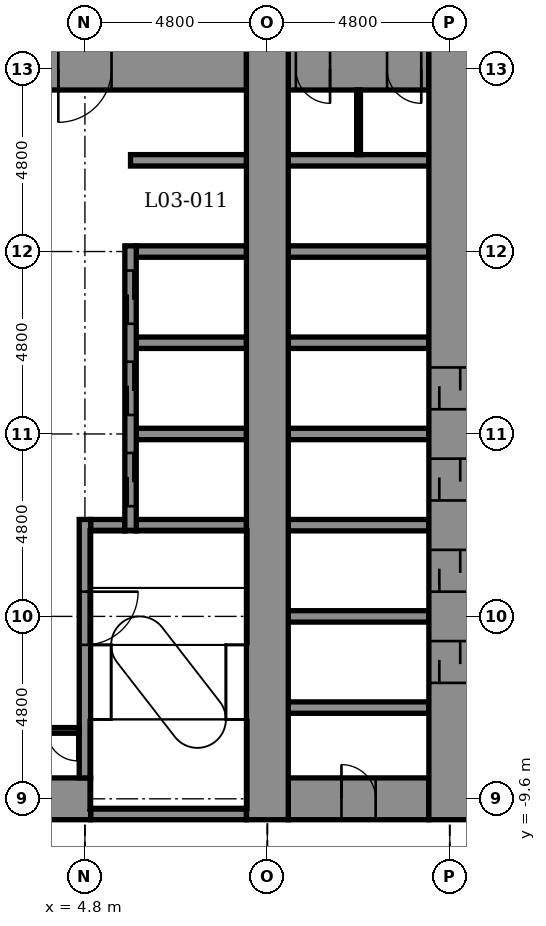
"""IFC4 building model, lengths in metres.
Left out: names, types, materials, properties, quantities, classifications, styles, units other than length and angle.
Written with IfcOpenShell. Run it as: python <this file> out.ifc"""

import sys

from ifc_helpers import new_model, si_unit, direction, frame, frame_2d, origin, place, context, subcontext, project, spatial, rectangle, extrude, element, fill, save


model = new_model("IFC4")
c1 = context("Model", 3, precision=1e-05, world=origin(), true_north=direction((0.0, 1.0)))
c2 = subcontext(c1, "Body", "Model", "MODEL_VIEW")
j1 = project(units=[si_unit("LENGTHUNIT", "METRE"), si_unit("PLANEANGLEUNIT", "RADIAN")], contexts=[c1])
p1 = place(None, origin())
s1 = spatial("IfcSite", under=j1, at=p1, CompositionType="ELEMENT")
p2 = place(p1, origin())
s2 = spatial("IfcBuilding", under=s1, at=p2, CompositionType="ELEMENT")
p3 = place(p2, frame((0.0, 0.0, 17.4)))
s3 = spatial("IfcBuildingStorey", under=s2, at=p3, CompositionType="ELEMENT", Elevation=17.4)
p4 = place(p3, frame((4.95, -10.0, -0.25), z_axis=(0.0, 0.0, 1.0), x_axis=(1.0, 0.0, 0.0)))
e1 = element("IfcWall", 1, at=p4, inside=s3, PredefinedType="STANDARD", context=c2, shape_type="SweptSolid", body=[
    extrude(rectangle(XDim=4.1, YDim=0.3, at=frame_2d((2.05, 0.0))), origin(), (0.0, 0.0, 1.0), 5.0),
])
p5 = place(p3, frame((-5.25, -9.6, -0.25), z_axis=(0.0, 0.0, 1.0), x_axis=(1.0, 0.0, 0.0)))
e2 = element("IfcWall", 2, at=p5, inside=s3, PredefinedType="SHEAR", context=c2, shape_type="SweptSolid", body=[
    extrude(rectangle(XDim=10.2, YDim=1.1, at=frame_2d((5.1, 0.0))), origin(), (0.0, 0.0, 1.0), 5.0),
])
p6 = place(p5, frame((0.6, 0.0, 0.25)))
e3 = element("IfcOpeningElement", 3, at=p6, cuts=e2, PredefinedType="OPENING", context=c2, shape_type="SweptSolid", body=[
    extrude(rectangle(XDim=0.9, YDim=2.1, at=frame_2d((0.45, 1.05))), frame((0.0, 0.56, 0.0), z_axis=(0.0, -1.0, 0.0), x_axis=(1.0, 0.0, 0.0)), (0.0, 0.0, 1.0), 1.12),
])
p7 = place(p3, frame((10.15, -9.6, -0.25), z_axis=(0.0, 0.0, 1.0), x_axis=(1.0, 0.0, 0.0)))
e4 = element("IfcWall", 4, at=p7, inside=s3, PredefinedType="SHEAR", context=c2, shape_type="SweptSolid", body=[
    extrude(rectangle(XDim=3.7, YDim=1.1, at=frame_2d((1.85, 0.0))), origin(), (0.0, 0.0, 1.0), 5.0),
])
p8 = place(p7, frame((1.4, 0.0, 0.25)))
e5 = element("IfcOpeningElement", 5, at=p8, cuts=e4, PredefinedType="OPENING", context=c2, shape_type="SweptSolid", body=[
    extrude(rectangle(XDim=0.9, YDim=2.1, at=frame_2d((0.45, 1.05))), frame((0.0, 0.56, 0.0), z_axis=(0.0, -1.0, 0.0), x_axis=(1.0, 0.0, 0.0)), (0.0, 0.0, 1.0), 1.12),
])
for number, where, z_axis, x_axis in (
    (6, (10.15, -7.2, -0.25), (0.0, 0.0, 1.0), (1.0, 0.0, 0.0)),
    (7, (10.15, -4.8, -0.25), (0.0, 0.0, 1.0), (1.0, 0.0, 0.0)),
):
    element("IfcWall", number, at=place(p3, frame(where, z_axis=z_axis, x_axis=x_axis)), inside=s3, PredefinedType="STANDARD", context=c2, shape_type="SweptSolid", body=[
        extrude(rectangle(XDim=3.7, YDim=0.3, at=frame_2d((1.85, 0.0))), origin(), (0.0, 0.0, 1.0), 5.0),
    ])
p9 = place(p3, frame((4.95, -2.4, -0.25), z_axis=(0.0, 0.0, 1.0), x_axis=(1.0, 0.0, 0.0)))
e8 = element("IfcWall", 8, at=p9, inside=s3, PredefinedType="STANDARD", context=c2, shape_type="SweptSolid", body=[
    extrude(rectangle(XDim=0.9, YDim=0.3, at=frame_2d((0.45, 0.0))), origin(), (0.0, 0.0, 1.0), 5.0),
])
p10 = place(p3, frame((6.15, -2.4, -0.25), z_axis=(0.0, 0.0, 1.0), x_axis=(1.0, 0.0, 0.0)))
e9 = element("IfcWall", 9, at=p10, inside=s3, PredefinedType="STANDARD", context=c2, shape_type="SweptSolid", body=[
    extrude(rectangle(XDim=2.9, YDim=0.3, at=frame_2d((1.45, 0.0))), origin(), (0.0, 0.0, 1.0), 5.0),
])
p11 = place(p3, frame((10.15, -2.4, -0.25), z_axis=(0.0, 0.0, 1.0), x_axis=(1.0, 0.0, 0.0)))
e10 = element("IfcWall", 10, at=p11, inside=s3, PredefinedType="STANDARD", context=c2, shape_type="SweptSolid", body=[
    extrude(rectangle(XDim=3.7, YDim=0.3, at=frame_2d((1.85, 0.0))), origin(), (0.0, 0.0, 1.0), 5.0),
])
p12 = place(p3, frame((6.15, 0.0, -0.25), z_axis=(0.0, 0.0, 1.0), x_axis=(1.0, 0.0, 0.0)))
e11 = element("IfcWall", 11, at=p12, inside=s3, PredefinedType="STANDARD", context=c2, shape_type="SweptSolid", body=[
    extrude(rectangle(XDim=2.9, YDim=0.3, at=frame_2d((1.45, 0.0))), origin(), (0.0, 0.0, 1.0), 5.0),
])
p13 = place(p3, frame((10.15, 0.0, -0.25), z_axis=(0.0, 0.0, 1.0), x_axis=(1.0, 0.0, 0.0)))
e12 = element("IfcWall", 12, at=p13, inside=s3, PredefinedType="STANDARD", context=c2, shape_type="SweptSolid", body=[
    extrude(rectangle(XDim=3.7, YDim=0.3, at=frame_2d((1.85, 0.0))), origin(), (0.0, 0.0, 1.0), 5.0),
])
p14 = place(p3, frame((6.15, 2.4, -0.25), z_axis=(0.0, 0.0, 1.0), x_axis=(1.0, 0.0, 0.0)))
e13 = element("IfcWall", 13, at=p14, inside=s3, PredefinedType="STANDARD", context=c2, shape_type="SweptSolid", body=[
    extrude(rectangle(XDim=2.9, YDim=0.3, at=frame_2d((1.45, 0.0))), origin(), (0.0, 0.0, 1.0), 5.0),
])
p15 = place(p3, frame((10.15, 2.4, -0.25), z_axis=(0.0, 0.0, 1.0), x_axis=(1.0, 0.0, 0.0)))
e14 = element("IfcWall", 14, at=p15, inside=s3, PredefinedType="STANDARD", context=c2, shape_type="SweptSolid", body=[
    extrude(rectangle(XDim=3.7, YDim=0.3, at=frame_2d((1.85, 0.0))), origin(), (0.0, 0.0, 1.0), 5.0),
])
p16 = place(p3, frame((6.15, 4.8, -0.25), z_axis=(0.0, 0.0, 1.0), x_axis=(1.0, 0.0, 0.0)))
e15 = element("IfcWall", 15, at=p16, inside=s3, PredefinedType="STANDARD", context=c2, shape_type="SweptSolid", body=[
    extrude(rectangle(XDim=2.9, YDim=0.3, at=frame_2d((1.45, 0.0))), origin(), (0.0, 0.0, 1.0), 5.0),
])
p17 = place(p3, frame((10.15, 4.8, -0.25), z_axis=(0.0, 0.0, 1.0), x_axis=(1.0, 0.0, 0.0)))
e16 = element("IfcWall", 16, at=p17, inside=s3, PredefinedType="STANDARD", context=c2, shape_type="SweptSolid", body=[
    extrude(rectangle(XDim=3.7, YDim=0.3, at=frame_2d((1.85, 0.0))), origin(), (0.0, 0.0, 1.0), 5.0),
])
p18 = place(p3, frame((6.0, 7.2, -0.25), z_axis=(0.0, 0.0, 1.0), x_axis=(1.0, 0.0, 0.0)))
e17 = element("IfcWall", 17, at=p18, inside=s3, PredefinedType="STANDARD", context=c2, shape_type="SweptSolid", body=[
    extrude(rectangle(XDim=3.05, YDim=0.3, at=frame_2d((1.525, 0.0))), origin(), (0.0, 0.0, 1.0), 5.0),
])
p19 = place(p3, frame((10.15, 7.2, -0.25), z_axis=(0.0, 0.0, 1.0), x_axis=(1.0, 0.0, 0.0)))
e18 = element("IfcWall", 18, at=p19, inside=s3, PredefinedType="STANDARD", context=c2, shape_type="SweptSolid", body=[
    extrude(rectangle(XDim=3.7, YDim=0.3, at=frame_2d((1.85, 0.0))), origin(), (0.0, 0.0, 1.0), 5.0),
])
p20 = place(p3, frame((-5.25, 9.6, -0.25), z_axis=(0.0, 0.0, 1.0), x_axis=(1.0, 0.0, 0.0)))
e19 = element("IfcWall", 19, at=p20, inside=s3, PredefinedType="SHEAR", context=c2, shape_type="SweptSolid", body=[
    extrude(rectangle(XDim=14.3, YDim=1.1, at=frame_2d((7.15, 0.0))), origin(), (0.0, 0.0, 1.0), 5.0),
])
p21 = place(p20, frame((9.35, 0.0, 0.25)))
e20 = element("IfcOpeningElement", 20, at=p21, cuts=e19, PredefinedType="OPENING", context=c2, shape_type="SweptSolid", body=[
    extrude(rectangle(XDim=1.4, YDim=2.1, at=frame_2d((0.7, 1.05))), frame((0.0, 0.56, 0.0), z_axis=(0.0, -1.0, 0.0), x_axis=(1.0, 0.0, 0.0)), (0.0, 0.0, 1.0), 1.12),
])
p22 = place(p3, frame((10.15, 9.6, -0.25), z_axis=(0.0, 0.0, 1.0), x_axis=(1.0, 0.0, 0.0)))
e21 = element("IfcWall", 21, at=p22, inside=s3, PredefinedType="SHEAR", context=c2, shape_type="SweptSolid", body=[
    extrude(rectangle(XDim=3.7, YDim=1.1, at=frame_2d((1.85, 0.0))), origin(), (0.0, 0.0, 1.0), 5.0),
])
p23 = place(p22, frame((0.2, 0.0, 0.25)))
e22 = element("IfcOpeningElement", 22, at=p23, cuts=e21, PredefinedType="OPENING", context=c2, shape_type="SweptSolid", body=[
    extrude(rectangle(XDim=0.9, YDim=2.1, at=frame_2d((0.45, 1.05))), frame((0.0, 0.56, 0.0), z_axis=(0.0, -1.0, 0.0), x_axis=(1.0, 0.0, 0.0)), (0.0, 0.0, 1.0), 1.12),
])
p24 = place(p22, frame((2.6, 0.0, 0.25)))
e23 = element("IfcOpeningElement", 23, at=p24, cuts=e21, PredefinedType="OPENING", context=c2, shape_type="SweptSolid", body=[
    extrude(rectangle(XDim=0.9, YDim=2.1, at=frame_2d((0.45, 1.05))), frame((0.0, 0.56, 0.0), z_axis=(0.0, -1.0, 0.0), x_axis=(1.0, 0.0, 0.0)), (0.0, 0.0, 1.0), 1.12),
])
p25 = place(p3, frame((4.8, -9.05, -0.25), z_axis=(0.0, 0.0, 1.0), x_axis=(0.0, 1.0, 0.0)))
e24 = element("IfcWall", 24, at=p25, inside=s3, PredefinedType="STANDARD", context=c2, shape_type="SweptSolid", body=[
    extrude(rectangle(XDim=6.8, YDim=0.3, at=frame_2d((3.4, 0.0))), origin(), (0.0, 0.0, 1.0), 5.0),
])
p26 = place(p25, frame((3.5, 0.0, 0.25)))
e25 = element("IfcOpeningElement", 25, at=p26, cuts=e24, PredefinedType="OPENING", context=c2, shape_type="SweptSolid", body=[
    extrude(rectangle(XDim=1.4, YDim=2.1, at=frame_2d((0.7, 1.05))), frame((0.0, 0.16, 0.0), z_axis=(0.0, -1.0, 0.0), x_axis=(1.0, 0.0, 0.0)), (0.0, 0.0, 1.0), 0.32),
])
p27 = place(p3, frame((6.0, -2.55, -0.25), z_axis=(0.0, 0.0, 1.0), x_axis=(0.0, 1.0, 0.0)))
e26 = element("IfcWall", 26, at=p27, inside=s3, PredefinedType="STANDARD", context=c2, shape_type="SweptSolid", body=[
    extrude(rectangle(XDim=7.5, YDim=0.3, at=frame_2d((3.75, 0.0))), origin(), (0.0, 0.0, 1.0), 5.0),
])
p28 = place(p27, frame((0.65, 0.0, 0.25)))
e27 = element("IfcOpeningElement", 27, at=p28, cuts=e26, PredefinedType="OPENING", context=c2, shape_type="SweptSolid", body=[
    extrude(rectangle(XDim=1.4, YDim=2.1, at=frame_2d((0.7, 1.05))), frame((0.0, 0.16, 0.0), z_axis=(0.0, -1.0, 0.0), x_axis=(1.0, 0.0, 0.0)), (0.0, 0.0, 1.0), 0.32),
])
p29 = place(p27, frame((3.05, 0.0, 0.25)))
e28 = element("IfcOpeningElement", 28, at=p29, cuts=e26, PredefinedType="OPENING", context=c2, shape_type="SweptSolid", body=[
    extrude(rectangle(XDim=1.4, YDim=2.1, at=frame_2d((0.7, 1.05))), frame((0.0, 0.16, 0.0), z_axis=(0.0, -1.0, 0.0), x_axis=(1.0, 0.0, 0.0)), (0.0, 0.0, 1.0), 0.32),
])
p30 = place(p27, frame((5.45, 0.0, 0.25)))
e29 = element("IfcOpeningElement", 29, at=p30, cuts=e26, PredefinedType="OPENING", context=c2, shape_type="SweptSolid", body=[
    extrude(rectangle(XDim=1.4, YDim=2.1, at=frame_2d((0.7, 1.05))), frame((0.0, 0.16, 0.0), z_axis=(0.0, -1.0, 0.0), x_axis=(1.0, 0.0, 0.0)), (0.0, 0.0, 1.0), 0.32),
])
p31 = place(p3, frame((9.6, -10.15, -0.25), z_axis=(0.0, 0.0, 1.0), x_axis=(0.0, 1.0, 0.0)))
e30 = element("IfcWall", 30, at=p31, inside=s3, PredefinedType="SHEAR", context=c2, shape_type="SweptSolid", body=[
    extrude(rectangle(XDim=20.3, YDim=1.1, at=frame_2d((10.15, 0.0))), origin(), (0.0, 0.0, 1.0), 5.0),
])
p32 = place(p3, frame((14.4, -10.15, -0.25), z_axis=(0.0, 0.0, 1.0), x_axis=(0.0, 1.0, 0.0)))
e31 = element("IfcWall", 31, at=p32, inside=s3, PredefinedType="SHEAR", context=c2, shape_type="SweptSolid", body=[
    extrude(rectangle(XDim=20.3, YDim=1.1, at=frame_2d((10.15, 0.0))), origin(), (0.0, 0.0, 1.0), 5.0),
])
p33 = place(p32, frame((3.6, 0.0, 0.25)))
e32 = element("IfcOpeningElement", 32, at=p33, cuts=e31, PredefinedType="OPENING", context=c2, shape_type="SweptSolid", body=[
    extrude(rectangle(XDim=1.1, YDim=2.1, at=frame_2d((0.55, 1.05))), frame((0.0, 0.56, 0.0), z_axis=(0.0, -1.0, 0.0), x_axis=(1.0, 0.0, 0.0)), (0.0, 0.0, 1.0), 1.12),
])
p34 = place(p32, frame((6.0, 0.0, 0.25)))
e33 = element("IfcOpeningElement", 33, at=p34, cuts=e31, PredefinedType="OPENING", context=c2, shape_type="SweptSolid", body=[
    extrude(rectangle(XDim=1.1, YDim=2.1, at=frame_2d((0.55, 1.05))), frame((0.0, 0.56, 0.0), z_axis=(0.0, -1.0, 0.0), x_axis=(1.0, 0.0, 0.0)), (0.0, 0.0, 1.0), 1.12),
])
p35 = place(p32, frame((8.4, 0.0, 0.25)))
e34 = element("IfcOpeningElement", 34, at=p35, cuts=e31, PredefinedType="OPENING", context=c2, shape_type="SweptSolid", body=[
    extrude(rectangle(XDim=1.1, YDim=2.1, at=frame_2d((0.55, 1.05))), frame((0.0, 0.56, 0.0), z_axis=(0.0, -1.0, 0.0), x_axis=(1.0, 0.0, 0.0)), (0.0, 0.0, 1.0), 1.12),
])
p36 = place(p32, frame((10.8, 0.0, 0.25)))
e35 = element("IfcOpeningElement", 35, at=p36, cuts=e31, PredefinedType="OPENING", context=c2, shape_type="SweptSolid", body=[
    extrude(rectangle(XDim=1.1, YDim=2.1, at=frame_2d((0.55, 1.05))), frame((0.0, 0.56, 0.0), z_axis=(0.0, -1.0, 0.0), x_axis=(1.0, 0.0, 0.0)), (0.0, 0.0, 1.0), 1.12),
])
p37 = place(p3, frame((12.0, 7.35, 0.0), z_axis=(0.0, 0.0, 1.0), x_axis=(0.0, 1.0, 0.0)))
e36 = element("IfcWall", 36, at=p37, inside=s3, PredefinedType="PARTITIONING", context=c2, shape_type="SweptSolid", body=[
    extrude(rectangle(XDim=1.7, YDim=0.1, at=frame_2d((0.85, 0.0))), origin(), (0.0, 0.0, 1.0), 4.75),
])
p38 = place(p3, frame((3.75, -7.8, 0.0), z_axis=(0.0, 0.0, 1.0), x_axis=(1.0, 0.0, 0.0)))
e37 = element("IfcWall", 37, at=p38, inside=s3, PredefinedType="PARTITIONING", context=c2, shape_type="SweptSolid", body=[
    extrude(rectangle(XDim=0.9, YDim=0.15, at=frame_2d((0.45, 0.0))), origin(), (0.0, 0.0, 1.0), 4.75),
])
p39 = place(p38, frame((0.05, 0.0, 0.0)))
e38 = element("IfcOpeningElement", 38, at=p39, cuts=e37, PredefinedType="OPENING", context=c2, shape_type="SweptSolid", body=[
    extrude(rectangle(XDim=0.8, YDim=2.1, at=frame_2d((0.4, 1.05))), frame((0.0, 0.085, 0.0), z_axis=(0.0, -1.0, 0.0), x_axis=(1.0, 0.0, 0.0)), (0.0, 0.0, 1.0), 0.17),
])
p40 = place(p39, frame((0.8, 0.0, 0.0), z_axis=(0.0, 0.0, 1.0), x_axis=(-1.0, 0.0, 0.0)))
e39 = element("IfcDoor", 39, at=p40, inside=s3, OperationType="SINGLE_SWING_RIGHT", PredefinedType="DOOR", context=c2, shape_type="SweptSolid", body=[
    extrude(rectangle(XDim=0.8, YDim=2.1, at=frame_2d((0.4, 1.05))), frame((0.0, 0.025, 0.0), z_axis=(0.0, -1.0, 0.0), x_axis=(1.0, 0.0, 0.0)), (0.0, 0.0, 1.0), 0.05),
])
fill(e38, e39)
p41 = place(p28, origin())
e40 = element("IfcDoor", 40, at=p41, inside=s3, OperationType="DOUBLE_DOOR_SLIDING", PredefinedType="DOOR", context=c2, shape_type="SweptSolid", body=[
    extrude(rectangle(XDim=1.4, YDim=2.1, at=frame_2d((0.7, 1.05))), frame((0.0, 0.025, 0.0), z_axis=(0.0, -1.0, 0.0), x_axis=(1.0, 0.0, 0.0)), (0.0, 0.0, 1.0), 0.05),
])
fill(e27, e40)
p42 = place(p29, origin())
e41 = element("IfcDoor", 41, at=p42, inside=s3, OperationType="DOUBLE_DOOR_SLIDING", PredefinedType="DOOR", context=c2, shape_type="SweptSolid", body=[
    extrude(rectangle(XDim=1.4, YDim=2.1, at=frame_2d((0.7, 1.05))), frame((0.0, 0.025, 0.0), z_axis=(0.0, -1.0, 0.0), x_axis=(1.0, 0.0, 0.0)), (0.0, 0.0, 1.0), 0.05),
])
fill(e28, e41)
p43 = place(p30, origin())
e42 = element("IfcDoor", 42, at=p43, inside=s3, OperationType="DOUBLE_DOOR_SLIDING", PredefinedType="DOOR", context=c2, shape_type="SweptSolid", body=[
    extrude(rectangle(XDim=1.4, YDim=2.1, at=frame_2d((0.7, 1.05))), frame((0.0, 0.025, 0.0), z_axis=(0.0, -1.0, 0.0), x_axis=(1.0, 0.0, 0.0)), (0.0, 0.0, 1.0), 0.05),
])
fill(e29, e42)
p44 = place(p33, origin())
e43 = element("IfcDoor", 43, at=p44, inside=s3, OperationType="DOUBLE_DOOR_SLIDING", PredefinedType="DOOR", context=c2, shape_type="SweptSolid", body=[
    extrude(rectangle(XDim=1.1, YDim=2.1, at=frame_2d((0.55, 1.05))), frame((0.0, 0.025, 0.0), z_axis=(0.0, -1.0, 0.0), x_axis=(1.0, 0.0, 0.0)), (0.0, 0.0, 1.0), 0.05),
])
fill(e32, e43)
p45 = place(p34, origin())
e44 = element("IfcDoor", 44, at=p45, inside=s3, OperationType="DOUBLE_DOOR_SLIDING", PredefinedType="DOOR", context=c2, shape_type="SweptSolid", body=[
    extrude(rectangle(XDim=1.1, YDim=2.1, at=frame_2d((0.55, 1.05))), frame((0.0, 0.025, 0.0), z_axis=(0.0, -1.0, 0.0), x_axis=(1.0, 0.0, 0.0)), (0.0, 0.0, 1.0), 0.05),
])
fill(e33, e44)
p46 = place(p35, origin())
e45 = element("IfcDoor", 45, at=p46, inside=s3, OperationType="DOUBLE_DOOR_SLIDING", PredefinedType="DOOR", context=c2, shape_type="SweptSolid", body=[
    extrude(rectangle(XDim=1.1, YDim=2.1, at=frame_2d((0.55, 1.05))), frame((0.0, 0.025, 0.0), z_axis=(0.0, -1.0, 0.0), x_axis=(1.0, 0.0, 0.0)), (0.0, 0.0, 1.0), 0.05),
])
fill(e34, e45)
p47 = place(p36, origin())
e46 = element("IfcDoor", 46, at=p47, inside=s3, OperationType="DOUBLE_DOOR_SLIDING", PredefinedType="DOOR", context=c2, shape_type="SweptSolid", body=[
    extrude(rectangle(XDim=1.1, YDim=2.1, at=frame_2d((0.55, 1.05))), frame((0.0, 0.025, 0.0), z_axis=(0.0, -1.0, 0.0), x_axis=(1.0, 0.0, 0.0)), (0.0, 0.0, 1.0), 0.05),
])
fill(e35, e46)
p48 = place(p26, frame((1.4, 0.0, 0.0), z_axis=(0.0, 0.0, 1.0), x_axis=(-1.0, 0.0, 0.0)))
e47 = element("IfcDoor", 47, at=p48, inside=s3, OperationType="SINGLE_SWING_RIGHT", PredefinedType="DOOR", context=c2, shape_type="SweptSolid", body=[
    extrude(rectangle(XDim=1.4, YDim=2.1, at=frame_2d((0.7, 1.05))), frame((0.0, 0.025, 0.0), z_axis=(0.0, -1.0, 0.0), x_axis=(1.0, 0.0, 0.0)), (0.0, 0.0, 1.0), 0.05),
])
fill(e25, e47)
p49 = place(p8, origin())
e48 = element("IfcDoor", 48, at=p49, inside=s3, OperationType="SINGLE_SWING_LEFT", PredefinedType="DOOR", context=c2, shape_type="SweptSolid", body=[
    extrude(rectangle(XDim=0.9, YDim=2.1, at=frame_2d((0.45, 1.05))), frame((0.0, 0.025, 0.0), z_axis=(0.0, -1.0, 0.0), x_axis=(1.0, 0.0, 0.0)), (0.0, 0.0, 1.0), 0.05),
])
fill(e5, e48)
p50 = place(p23, frame((0.9, 0.0, 0.0), z_axis=(0.0, 0.0, 1.0), x_axis=(-1.0, 0.0, 0.0)))
e49 = element("IfcDoor", 49, at=p50, inside=s3, OperationType="SINGLE_SWING_RIGHT", PredefinedType="DOOR", context=c2, shape_type="SweptSolid", body=[
    extrude(rectangle(XDim=0.9, YDim=2.1, at=frame_2d((0.45, 1.05))), frame((0.0, 0.025, 0.0), z_axis=(0.0, -1.0, 0.0), x_axis=(1.0, 0.0, 0.0)), (0.0, 0.0, 1.0), 0.05),
])
fill(e22, e49)
p51 = place(p24, frame((0.9, 0.0, 0.0), z_axis=(0.0, 0.0, 1.0), x_axis=(-1.0, 0.0, 0.0)))
e50 = element("IfcDoor", 50, at=p51, inside=s3, OperationType="SINGLE_SWING_RIGHT", PredefinedType="DOOR", context=c2, shape_type="SweptSolid", body=[
    extrude(rectangle(XDim=0.9, YDim=2.1, at=frame_2d((0.45, 1.05))), frame((0.0, 0.025, 0.0), z_axis=(0.0, -1.0, 0.0), x_axis=(1.0, 0.0, 0.0)), (0.0, 0.0, 1.0), 0.05),
])
fill(e23, e50)
p52 = place(p21, frame((1.4, 0.0, 0.0), z_axis=(0.0, 0.0, 1.0), x_axis=(-1.0, 0.0, 0.0)))
e51 = element("IfcDoor", 51, at=p52, inside=s3, OperationType="SINGLE_SWING_LEFT", PredefinedType="DOOR", context=c2, shape_type="SweptSolid", body=[
    extrude(rectangle(XDim=1.4, YDim=2.1, at=frame_2d((0.7, 1.05))), frame((0.0, 0.025, 0.0), z_axis=(0.0, -1.0, 0.0), x_axis=(1.0, 0.0, 0.0)), (0.0, 0.0, 1.0), 0.05),
])
fill(e20, e51)
save(model, sys.argv[1])
